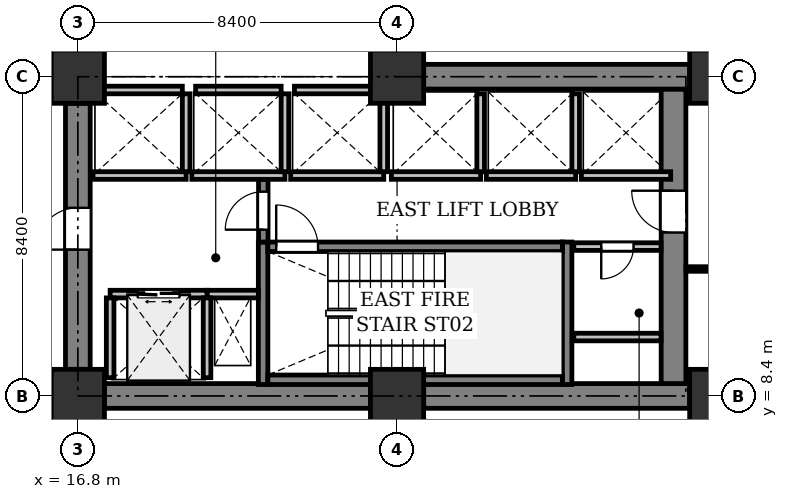
"""IFC4 building model, lengths in metres.
Left out: names, types, materials, properties, quantities, classifications, styles, units other than length and angle.
Written with IfcOpenShell. Run it as: python <this file> out.ifc"""

import sys

from ifc_helpers import new_model, si_unit, direction, frame, frame_2d, origin, origin_2d, place, context, subcontext, project, spatial, rectangle, extrude, element, fill, save


model = new_model("IFC4")
c1 = context("Model", 3, precision=1e-05, world=origin(), true_north=direction((0.0, 1.0)))
c2 = subcontext(c1, "Body", "Model", "MODEL_VIEW")
j1 = project(units=[si_unit("LENGTHUNIT", "METRE"), si_unit("PLANEANGLEUNIT", "RADIAN")], contexts=[c1])
p1 = place(None, origin())
s1 = spatial("IfcSite", under=j1, at=p1, CompositionType="ELEMENT")
p2 = place(p1, origin())
s2 = spatial("IfcBuilding", under=s1, at=p2, CompositionType="ELEMENT")
p3 = place(p2, frame((0.0, 0.0, 62.6)))
s3 = spatial("IfcBuildingStorey", under=s2, at=p3, CompositionType="ELEMENT", Elevation=62.6)
for number, where, z_axis, x_axis in (
    (1, (16.8, 8.4, 0.0), (0.0, 0.0, 1.0), (1.0, 0.0, 0.0)),
    (2, (16.8, 16.8, 0.0), (0.0, 0.0, 1.0), (1.0, 0.0, 0.0)),
    (3, (25.2, 8.4, 0.0), (0.0, 0.0, 1.0), (1.0, 0.0, 0.0)),
    (4, (25.2, 16.8, 0.0), (0.0, 0.0, 1.0), (1.0, 0.0, 0.0)),
    (5, (33.6, 8.4, 0.0), (0.0, 0.0, 1.0), (1.0, 0.0, 0.0)),
    (6, (33.6, 16.8, 0.0), (0.0, 0.0, 1.0), (1.0, 0.0, 0.0)),
):
    element("IfcColumn", number, at=place(p3, frame(where, z_axis=z_axis, x_axis=x_axis)), inside=s3, PredefinedType="COLUMN", context=c2, shape_type="SweptSolid", body=[
        extrude(rectangle(XDim=1.4, YDim=1.4, at=origin_2d()), origin(), (0.0, 0.0, 1.0), 4.2),
    ])
for number, where, z_axis, x_axis in (
    (7, (17.5, 8.4, 0.0), (0.0, 0.0, 1.0), (1.0, 0.0, 0.0)),
    (8, (25.9, 8.4, 0.0), (0.0, 0.0, 1.0), (1.0, 0.0, 0.0)),
):
    element("IfcWall", number, at=place(p3, frame(where, z_axis=z_axis, x_axis=x_axis)), inside=s3, PredefinedType="SHEAR", context=c2, shape_type="SweptSolid", body=[
        extrude(rectangle(XDim=7.0, YDim=0.65, at=frame_2d((3.5, 0.0))), origin(), (0.0, 0.0, 1.0), 3.925),
    ])
p4 = place(p3, frame((32.475, 8.725, 0.0), z_axis=(0.0, 0.0, 1.0), x_axis=(0.0, 1.0, 0.0)))
e9 = element("IfcWall", 9, at=p4, inside=s3, PredefinedType="SHEAR", context=c2, shape_type="SweptSolid", body=[
    extrude(rectangle(XDim=7.75, YDim=0.65, at=frame_2d((3.875, 0.0))), origin(), (0.0, 0.0, 1.0), 3.925),
])
p5 = place(p4, frame((3.975, 0.0, 0.0)))
e10 = element("IfcOpeningElement", 10, at=p5, cuts=e9, PredefinedType="OPENING", context=c2, shape_type="SweptSolid", body=[
    extrude(rectangle(XDim=1.1, YDim=2.15, at=frame_2d((0.55, 1.075))), frame((0.0, 0.335, 0.0), z_axis=(0.0, -1.0, 0.0), x_axis=(1.0, 0.0, 0.0)), (0.0, 0.0, 1.0), 0.67),
])
p6 = place(p3, frame((16.8, 9.1, 0.0), z_axis=(0.0, 0.0, 1.0), x_axis=(0.0, 1.0, 0.0)))
e11 = element("IfcWall", 11, at=p6, inside=s3, PredefinedType="SHEAR", context=c2, shape_type="SweptSolid", body=[
    extrude(rectangle(XDim=7.0, YDim=0.65, at=frame_2d((3.5, 0.0))), origin(), (0.0, 0.0, 1.0), 3.925),
])
p7 = place(p6, frame((3.15, 0.0, 0.0)))
e12 = element("IfcOpeningElement", 12, at=p7, cuts=e11, PredefinedType="OPENING", context=c2, shape_type="SweptSolid", body=[
    extrude(rectangle(XDim=1.1, YDim=2.15, at=frame_2d((0.55, 1.075))), frame((0.0, 0.335, 0.0), z_axis=(0.0, -1.0, 0.0), x_axis=(1.0, 0.0, 0.0)), (0.0, 0.0, 1.0), 0.67),
])
p8 = place(p3, frame((25.9, 16.8, 0.0), z_axis=(0.0, 0.0, 1.0), x_axis=(1.0, 0.0, 0.0)))
e13 = element("IfcWall", 13, at=p8, inside=s3, PredefinedType="SHEAR", context=c2, shape_type="SweptSolid", body=[
    extrude(rectangle(XDim=7.0, YDim=0.65, at=frame_2d((3.5, 0.0))), origin(), (0.0, 0.0, 1.0), 3.925),
])
for number, where, z_axis, x_axis in (
    (14, (21.675, 8.7, 0.0), (0.0, 0.0, 1.0), (0.0, 1.0, 0.0)),
    (15, (29.675, 8.7, 0.0), (0.0, 0.0, 1.0), (0.0, 1.0, 0.0)),
):
    element("IfcWall", number, at=place(p3, frame(where, z_axis=z_axis, x_axis=x_axis)), inside=s3, PredefinedType="SHEAR", context=c2, shape_type="SweptSolid", body=[
        extrude(rectangle(XDim=3.75, YDim=0.25, at=frame_2d((1.875, 0.0))), origin(), (0.0, 0.0, 1.0), 3.925),
    ])
p9 = place(p3, frame((21.8, 8.825, 0.0), z_axis=(0.0, 0.0, 1.0), x_axis=(1.0, 0.0, 0.0)))
e16 = element("IfcWall", 16, at=p9, inside=s3, PredefinedType="SHEAR", context=c2, shape_type="SweptSolid", body=[
    extrude(rectangle(XDim=7.75, YDim=0.25, at=frame_2d((3.875, 0.0))), origin(), (0.0, 0.0, 1.0), 3.925),
])
p10 = place(p3, frame((21.8, 12.325, 0.0), z_axis=(0.0, 0.0, 1.0), x_axis=(1.0, 0.0, 0.0)))
e17 = element("IfcWall", 17, at=p10, inside=s3, PredefinedType="SHEAR", context=c2, shape_type="SweptSolid", body=[
    extrude(rectangle(XDim=7.75, YDim=0.25, at=frame_2d((3.875, 0.0))), origin(), (0.0, 0.0, 1.0), 3.925),
])
p11 = place(p10, frame((0.22, 0.0, 0.0)))
e18 = element("IfcOpeningElement", 18, at=p11, cuts=e17, PredefinedType="OPENING", context=c2, shape_type="SweptSolid", body=[
    extrude(rectangle(XDim=1.1, YDim=2.15, at=frame_2d((0.55, 1.075))), frame((0.0, 0.135, 0.0), z_axis=(0.0, -1.0, 0.0), x_axis=(1.0, 0.0, 0.0)), (0.0, 0.0, 1.0), 0.27),
])
p12 = place(p3, frame((20.2, 11.08, 0.0), z_axis=(0.0, 0.0, 1.0), x_axis=(1.0, 0.0, 0.0)))
e19 = element("IfcWall", 19, at=p12, inside=s3, PredefinedType="PARTITIONING", context=c2, shape_type="SweptSolid", body=[
    extrude(rectangle(XDim=1.35, YDim=0.2, at=frame_2d((0.675, 0.0))), origin(), (0.0, 0.0, 1.0), 3.925),
])
p13 = place(p3, frame((21.68, 12.45, 0.0), z_axis=(0.0, 0.0, 1.0), x_axis=(0.0, 1.0, 0.0)))
e20 = element("IfcWall", 20, at=p13, inside=s3, PredefinedType="SHEAR", context=c2, shape_type="SweptSolid", body=[
    extrude(rectangle(XDim=1.65, YDim=0.25, at=frame_2d((0.825, 0.0))), origin(), (0.0, 0.0, 1.0), 3.925),
])
p14 = place(p13, frame((0.325, 0.0, 0.0)))
e21 = element("IfcOpeningElement", 21, at=p14, cuts=e20, PredefinedType="OPENING", context=c2, shape_type="SweptSolid", body=[
    extrude(rectangle(XDim=1.0, YDim=2.15, at=frame_2d((0.5, 1.075))), frame((0.0, 0.135, 0.0), z_axis=(0.0, -1.0, 0.0), x_axis=(1.0, 0.0, 0.0)), (0.0, 0.0, 1.0), 0.27),
])
p15 = place(p3, frame((17.65, 11.08, 0.0), z_axis=(0.0, 0.0, 1.0), x_axis=(1.0, 0.0, 0.0)))
e22 = element("IfcWall", 22, at=p15, inside=s3, PredefinedType="PARTITIONING", context=c2, shape_type="SweptSolid", body=[
    extrude(rectangle(XDim=2.55, YDim=0.2, at=frame_2d((1.275, 0.0))), origin(), (0.0, 0.0, 1.0), 3.925),
])
p16 = place(p15, frame((0.725, 0.0, 0.0)))
e23 = element("IfcOpeningElement", 23, at=p16, cuts=e22, PredefinedType="OPENING", context=c2, shape_type="SweptSolid", body=[
    extrude(rectangle(XDim=1.1, YDim=2.2, at=frame_2d((0.55, 1.1))), frame((0.0, 0.11, 0.0), z_axis=(0.0, -1.0, 0.0), x_axis=(1.0, 0.0, 0.0)), (0.0, 0.0, 1.0), 0.22),
])
for number, where, z_axis, x_axis in (
    (24, (20.2, 8.88, 0.0), (0.0, 0.0, 1.0), (0.0, 1.0, 0.0)),
    (25, (17.65, 8.88, 0.0), (0.0, 0.0, 1.0), (0.0, 1.0, 0.0)),
):
    element("IfcWall", number, at=place(p3, frame(where, z_axis=z_axis, x_axis=x_axis)), inside=s3, PredefinedType="PARTITIONING", context=c2, shape_type="SweptSolid", body=[
        extrude(rectangle(XDim=2.1, YDim=0.2, at=frame_2d((1.05, 0.0))), origin(), (0.0, 0.0, 1.0), 3.925),
    ])
p17 = place(p3, frame((17.2, 14.2, 0.0), z_axis=(0.0, 0.0, 1.0), x_axis=(1.0, 0.0, 0.0)))
e26 = element("IfcWall", 26, at=p17, inside=s3, PredefinedType="PARTITIONING", context=c2, shape_type="SweptSolid", body=[
    extrude(rectangle(XDim=2.45, YDim=0.2, at=frame_2d((1.225, 0.0))), origin(), (0.0, 0.0, 1.0), 3.925),
])
p18 = place(p3, frame((19.65, 14.3, 0.0), z_axis=(0.0, 0.0, 1.0), x_axis=(0.0, 1.0, 0.0)))
e27 = element("IfcWall", 27, at=p18, inside=s3, PredefinedType="PARTITIONING", context=c2, shape_type="SweptSolid", body=[
    extrude(rectangle(XDim=2.05, YDim=0.2, at=frame_2d((1.025, 0.0))), origin(), (0.0, 0.0, 1.0), 3.925),
])
p19 = place(p3, frame((17.3, 16.45, 0.0), z_axis=(0.0, 0.0, 1.0), x_axis=(1.0, 0.0, 0.0)))
e28 = element("IfcWall", 28, at=p19, inside=s3, PredefinedType="PARTITIONING", context=c2, shape_type="SweptSolid", body=[
    extrude(rectangle(XDim=2.25, YDim=0.2, at=frame_2d((1.125, 0.0))), origin(), (0.0, 0.0, 1.0), 3.925),
])
p20 = place(p3, frame((19.8, 14.2, 0.0), z_axis=(0.0, 0.0, 1.0), x_axis=(1.0, 0.0, 0.0)))
e29 = element("IfcWall", 29, at=p20, inside=s3, PredefinedType="PARTITIONING", context=c2, shape_type="SweptSolid", body=[
    extrude(rectangle(XDim=2.45, YDim=0.2, at=frame_2d((1.225, 0.0))), origin(), (0.0, 0.0, 1.0), 3.925),
])
p21 = place(p3, frame((22.25, 14.3, 0.0), z_axis=(0.0, 0.0, 1.0), x_axis=(0.0, 1.0, 0.0)))
e30 = element("IfcWall", 30, at=p21, inside=s3, PredefinedType="PARTITIONING", context=c2, shape_type="SweptSolid", body=[
    extrude(rectangle(XDim=2.05, YDim=0.2, at=frame_2d((1.025, 0.0))), origin(), (0.0, 0.0, 1.0), 3.925),
])
p22 = place(p3, frame((19.9, 16.45, 0.0), z_axis=(0.0, 0.0, 1.0), x_axis=(1.0, 0.0, 0.0)))
e31 = element("IfcWall", 31, at=p22, inside=s3, PredefinedType="PARTITIONING", context=c2, shape_type="SweptSolid", body=[
    extrude(rectangle(XDim=2.25, YDim=0.2, at=frame_2d((1.125, 0.0))), origin(), (0.0, 0.0, 1.0), 3.925),
])
p23 = place(p3, frame((22.4, 14.2, 0.0), z_axis=(0.0, 0.0, 1.0), x_axis=(1.0, 0.0, 0.0)))
e32 = element("IfcWall", 32, at=p23, inside=s3, PredefinedType="PARTITIONING", context=c2, shape_type="SweptSolid", body=[
    extrude(rectangle(XDim=2.45, YDim=0.2, at=frame_2d((1.225, 0.0))), origin(), (0.0, 0.0, 1.0), 3.925),
])
p24 = place(p3, frame((24.85, 14.3, 0.0), z_axis=(0.0, 0.0, 1.0), x_axis=(0.0, 1.0, 0.0)))
e33 = element("IfcWall", 33, at=p24, inside=s3, PredefinedType="PARTITIONING", context=c2, shape_type="SweptSolid", body=[
    extrude(rectangle(XDim=2.05, YDim=0.2, at=frame_2d((1.025, 0.0))), origin(), (0.0, 0.0, 1.0), 3.925),
])
p25 = place(p3, frame((22.5, 16.45, 0.0), z_axis=(0.0, 0.0, 1.0), x_axis=(1.0, 0.0, 0.0)))
e34 = element("IfcWall", 34, at=p25, inside=s3, PredefinedType="PARTITIONING", context=c2, shape_type="SweptSolid", body=[
    extrude(rectangle(XDim=2.25, YDim=0.2, at=frame_2d((1.125, 0.0))), origin(), (0.0, 0.0, 1.0), 3.925),
])
p26 = place(p3, frame((25.05, 14.2, 0.0), z_axis=(0.0, 0.0, 1.0), x_axis=(1.0, 0.0, 0.0)))
e35 = element("IfcWall", 35, at=p26, inside=s3, PredefinedType="PARTITIONING", context=c2, shape_type="SweptSolid", body=[
    extrude(rectangle(XDim=2.35, YDim=0.2, at=frame_2d((1.175, 0.0))), origin(), (0.0, 0.0, 1.0), 3.925),
])
p27 = place(p3, frame((27.4, 14.3, 0.0), z_axis=(0.0, 0.0, 1.0), x_axis=(0.0, 1.0, 0.0)))
e36 = element("IfcWall", 36, at=p27, inside=s3, PredefinedType="PARTITIONING", context=c2, shape_type="SweptSolid", body=[
    extrude(rectangle(XDim=2.05, YDim=0.2, at=frame_2d((1.025, 0.0))), origin(), (0.0, 0.0, 1.0), 3.925),
])
p28 = place(p3, frame((27.55, 14.2, 0.0), z_axis=(0.0, 0.0, 1.0), x_axis=(1.0, 0.0, 0.0)))
e37 = element("IfcWall", 37, at=p28, inside=s3, PredefinedType="PARTITIONING", context=c2, shape_type="SweptSolid", body=[
    extrude(rectangle(XDim=2.35, YDim=0.2, at=frame_2d((1.175, 0.0))), origin(), (0.0, 0.0, 1.0), 3.925),
])
p29 = place(p3, frame((29.9, 14.3, 0.0), z_axis=(0.0, 0.0, 1.0), x_axis=(0.0, 1.0, 0.0)))
e38 = element("IfcWall", 38, at=p29, inside=s3, PredefinedType="PARTITIONING", context=c2, shape_type="SweptSolid", body=[
    extrude(rectangle(XDim=2.05, YDim=0.2, at=frame_2d((1.025, 0.0))), origin(), (0.0, 0.0, 1.0), 3.925),
])
p30 = place(p3, frame((30.05, 14.2, 0.0), z_axis=(0.0, 0.0, 1.0), x_axis=(1.0, 0.0, 0.0)))
e39 = element("IfcWall", 39, at=p30, inside=s3, PredefinedType="PARTITIONING", context=c2, shape_type="SweptSolid", body=[
    extrude(rectangle(XDim=2.35, YDim=0.2, at=frame_2d((1.175, 0.0))), origin(), (0.0, 0.0, 1.0), 3.925),
])
p31 = place(p3, frame((32.146, 12.33, 0.0), z_axis=(0.0, 0.0, 1.0), x_axis=(-1.0, 0.0, 0.0)))
e40 = element("IfcWall", 40, at=p31, inside=s3, PredefinedType="PARTITIONING", context=c2, shape_type="SweptSolid", body=[
    extrude(rectangle(XDim=2.296, YDim=0.2, at=frame_2d((1.148, 0.0))), origin(), (0.0, 0.0, 1.0), 3.925),
])
p32 = place(p31, frame((0.723, 0.0, 0.0)))
e41 = element("IfcOpeningElement", 41, at=p32, cuts=e40, PredefinedType="OPENING", context=c2, shape_type="SweptSolid", body=[
    extrude(rectangle(XDim=0.85, YDim=2.15, at=frame_2d((0.425, 1.075))), frame((0.0, 0.11, 0.0), z_axis=(0.0, -1.0, 0.0), x_axis=(1.0, 0.0, 0.0)), (0.0, 0.0, 1.0), 0.22),
])
p33 = place(p3, frame((29.85, 9.95, 0.0), z_axis=(0.0, 0.0, 1.0), x_axis=(1.0, 0.0, 0.0)))
e42 = element("IfcWall", 42, at=p33, inside=s3, PredefinedType="PARTITIONING", context=c2, shape_type="SweptSolid", body=[
    extrude(rectangle(XDim=2.296, YDim=0.2, at=frame_2d((1.148, 0.0))), origin(), (0.0, 0.0, 1.0), 3.925),
])
p34 = place(p3, frame((34.261, 11.74, 0.0), z_axis=(0.0, 0.0, 1.0), x_axis=(-1.0, 0.0, 0.0)))
e43 = element("IfcWall", 43, at=p34, inside=s3, PredefinedType="PARTITIONING", context=c2, shape_type="SweptSolid", body=[
    extrude(rectangle(XDim=1.457, YDim=0.12, at=frame_2d((0.729, 0.0))), origin(), (0.0, 0.0, 1.0), 3.323),
])
p35 = place(p5, origin())
e44 = element("IfcDoor", 44, at=p35, inside=s3, OperationType="SINGLE_SWING_RIGHT", PredefinedType="DOOR", context=c2, shape_type="SweptSolid", body=[
    extrude(rectangle(XDim=1.1, YDim=2.15, at=frame_2d((0.55, 1.075))), frame((0.0, 0.025, 0.0), z_axis=(0.0, -1.0, 0.0), x_axis=(1.0, 0.0, 0.0)), (0.0, 0.0, 1.0), 0.05),
])
fill(e10, e44)
p36 = place(p7, origin())
e45 = element("IfcDoor", 45, at=p36, inside=s3, OperationType="SINGLE_SWING_LEFT", PredefinedType="DOOR", context=c2, shape_type="SweptSolid", body=[
    extrude(rectangle(XDim=1.1, YDim=2.15, at=frame_2d((0.55, 1.075))), frame((0.0, 0.025, 0.0), z_axis=(0.0, -1.0, 0.0), x_axis=(1.0, 0.0, 0.0)), (0.0, 0.0, 1.0), 0.05),
])
fill(e12, e45)
p37 = place(p11, origin())
e46 = element("IfcDoor", 46, at=p37, inside=s3, OperationType="SINGLE_SWING_LEFT", PredefinedType="DOOR", context=c2, shape_type="SweptSolid", body=[
    extrude(rectangle(XDim=1.1, YDim=2.15, at=frame_2d((0.55, 1.075))), frame((0.0, 0.025, 0.0), z_axis=(0.0, -1.0, 0.0), x_axis=(1.0, 0.0, 0.0)), (0.0, 0.0, 1.0), 0.05),
])
fill(e18, e46)
p38 = place(p14, origin())
e47 = element("IfcDoor", 47, at=p38, inside=s3, OperationType="SINGLE_SWING_LEFT", PredefinedType="DOOR", context=c2, shape_type="SweptSolid", body=[
    extrude(rectangle(XDim=1.0, YDim=2.15, at=frame_2d((0.5, 1.075))), frame((0.0, 0.025, 0.0), z_axis=(0.0, -1.0, 0.0), x_axis=(1.0, 0.0, 0.0)), (0.0, 0.0, 1.0), 0.05),
])
fill(e21, e47)
p39 = place(p16, origin())
e48 = element("IfcDoor", 48, at=p39, inside=s3, OperationType="DOUBLE_DOOR_SLIDING", PredefinedType="DOOR", context=c2, shape_type="SweptSolid", body=[
    extrude(rectangle(XDim=1.1, YDim=2.2, at=frame_2d((0.55, 1.1))), frame((0.0, 0.025, 0.0), z_axis=(0.0, -1.0, 0.0), x_axis=(1.0, 0.0, 0.0)), (0.0, 0.0, 1.0), 0.05),
])
fill(e23, e48)
p40 = place(p32, origin())
e49 = element("IfcDoor", 49, at=p40, inside=s3, OperationType="SINGLE_SWING_RIGHT", PredefinedType="DOOR", context=c2, shape_type="SweptSolid", body=[
    extrude(rectangle(XDim=0.85, YDim=2.15, at=frame_2d((0.425, 1.075))), frame((0.0, 0.025, 0.0), z_axis=(0.0, -1.0, 0.0), x_axis=(1.0, 0.0, 0.0)), (0.0, 0.0, 1.0), 0.05),
])
fill(e41, e49)
save(model, sys.argv[1])
